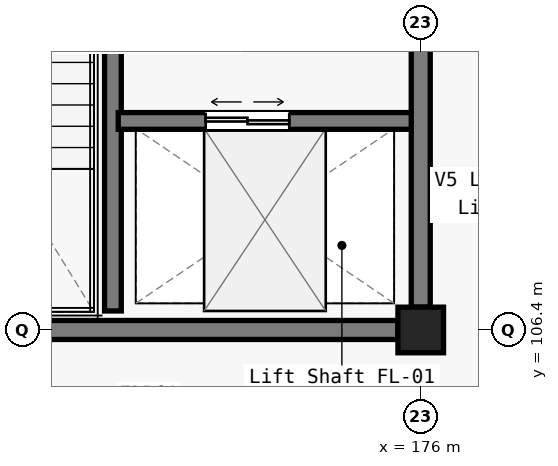
"""IFC4 building model, lengths in metres.
Left out: names, types, materials, properties, quantities, classifications, styles, units other than length and angle.
Written with IfcOpenShell. Run it as: python <this file> out.ifc"""

import sys

from ifc_helpers import new_model, si_unit, direction, frame, frame_2d, origin, origin_2d, place, context, subcontext, project, spatial, rectangle, extrude, element, fill, save


model = new_model("IFC4")
c1 = context("Model", 3, precision=1e-05, world=origin(), true_north=direction((0.0, 1.0)))
c2 = subcontext(c1, "Body", "Model", "MODEL_VIEW")
j1 = project(units=[si_unit("LENGTHUNIT", "METRE"), si_unit("PLANEANGLEUNIT", "RADIAN")], contexts=[c1])
p1 = place(None, origin())
s1 = spatial("IfcSite", under=j1, at=p1, CompositionType="ELEMENT")
p2 = place(p1, origin())
s2 = spatial("IfcBuilding", under=s1, at=p2, CompositionType="ELEMENT")
p3 = place(p2, frame((0.0, 0.0, 10.2)))
s3 = spatial("IfcBuildingStorey", under=s2, at=p3, CompositionType="ELEMENT", Elevation=10.2)
p4 = place(p3, frame((176.0, 106.4, 0.0), z_axis=(0.0, 0.0, 1.0), x_axis=(1.0, 0.0, 0.0)))
e1 = element("IfcColumn", 1, at=p4, inside=s3, PredefinedType="COLUMN", context=c2, shape_type="SweptSolid", body=[
    extrude(rectangle(XDim=0.6, YDim=0.6, at=origin_2d()), origin(), (0.0, 0.0, 1.0), 4.8),
])
p5 = place(p3, frame((168.25, 106.4, 0.0), z_axis=(0.0, 0.0, 1.0), x_axis=(1.0, 0.0, 0.0)))
e2 = element("IfcWall", 2, at=p5, inside=s3, PredefinedType="SOLIDWALL", context=c2, shape_type="SweptSolid", body=[
    extrude(rectangle(XDim=7.45, YDim=0.25, at=frame_2d((3.725, 0.0))), origin(), (0.0, 0.0, 1.0), 3.645),
])
p6 = place(p3, frame((171.95, 106.65, 0.0), z_axis=(0.0, 0.0, 1.0), x_axis=(0.0, 1.0, 0.0)))
e3 = element("IfcWall", 3, at=p6, inside=s3, PredefinedType="SOLIDWALL", context=c2, shape_type="SweptSolid", body=[
    extrude(rectangle(XDim=7.1, YDim=0.22, at=frame_2d((3.55, 0.0))), origin(), (0.0, 0.0, 1.0), 4.52),
])
p7 = place(p6, frame((5.55, 0.0, 0.0)))
e4 = element("IfcOpeningElement", 4, at=p7, cuts=e3, PredefinedType="OPENING", context=c2, shape_type="SweptSolid", body=[
    extrude(rectangle(XDim=1.2, YDim=2.15, at=frame_2d((0.6, 1.075))), frame((0.0, 0.12, 0.0), z_axis=(0.0, -1.0, 0.0), x_axis=(1.0, 0.0, 0.0)), (0.0, 0.0, 1.0), 0.24),
])
p8 = place(p3, frame((172.02, 109.15, 0.0), z_axis=(0.0, 0.0, 1.0), x_axis=(1.0, 0.0, 0.0)))
e5 = element("IfcWall", 5, at=p8, inside=s3, PredefinedType="SOLIDWALL", context=c2, shape_type="SweptSolid", body=[
    extrude(rectangle(XDim=3.93, YDim=0.22, at=frame_2d((1.965, 0.0))), origin(), (0.0, 0.0, 1.0), 3.895),
])
p9 = place(p8, frame((1.15, 0.0, 0.0)))
e6 = element("IfcOpeningElement", 6, at=p9, cuts=e5, PredefinedType="OPENING", context=c2, shape_type="SweptSolid", body=[
    extrude(rectangle(XDim=1.1, YDim=2.2, at=frame_2d((0.55, 1.1))), frame((0.0, 0.12, 0.0), z_axis=(0.0, -1.0, 0.0), x_axis=(1.0, 0.0, 0.0)), (0.0, 0.0, 1.0), 0.24),
])
p10 = place(p3, frame((176.0, 106.7, 0.0), z_axis=(0.0, 0.0, 1.0), x_axis=(0.0, 1.0, 0.0)))
e7 = element("IfcWall", 7, at=p10, inside=s3, PredefinedType="SOLIDWALL", context=c2, shape_type="SweptSolid", body=[
    extrude(rectangle(XDim=7.05, YDim=0.25, at=frame_2d((3.525, 0.0))), origin(), (0.0, 0.0, 1.0), 3.645),
])
p11 = place(p10, frame((3.55, 0.0, 0.0)))
e8 = element("IfcOpeningElement", 8, at=p11, cuts=e7, PredefinedType="OPENING", context=c2, shape_type="SweptSolid", body=[
    extrude(rectangle(XDim=1.35, YDim=2.2, at=frame_2d((0.675, 1.1))), frame((0.0, 0.135, 0.0), z_axis=(0.0, -1.0, 0.0), x_axis=(1.0, 0.0, 0.0)), (0.0, 0.0, 1.0), 0.27),
])
p12 = place(p9, origin())
e9 = element("IfcDoor", 9, at=p12, inside=s3, OperationType="DOUBLE_DOOR_SLIDING", PredefinedType="DOOR", context=c2, shape_type="SweptSolid", body=[
    extrude(rectangle(XDim=1.1, YDim=2.2, at=frame_2d((0.55, 1.1))), frame((0.0, 0.025, 0.0), z_axis=(0.0, -1.0, 0.0), x_axis=(1.0, 0.0, 0.0)), (0.0, 0.0, 1.0), 0.05),
])
fill(e6, e9)
save(model, sys.argv[1])
